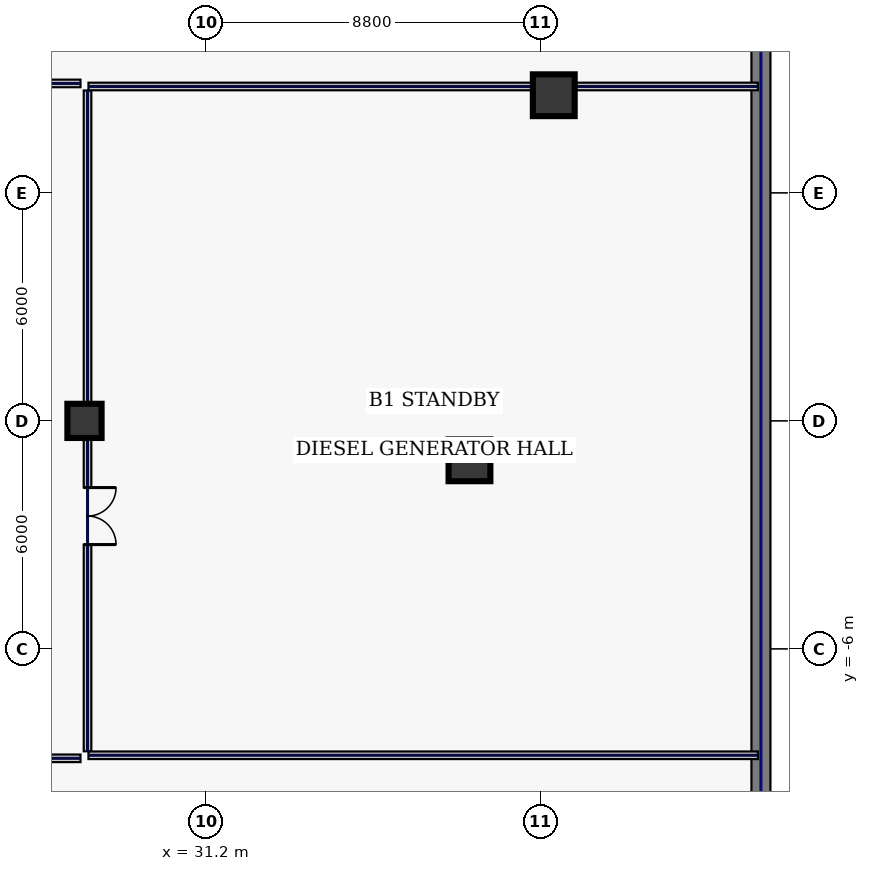
"""IFC4 building model, lengths in metres.
Left out: names, types, materials, properties, quantities, classifications, styles, units other than length and angle.
Written with IfcOpenShell. Run it as: python <this file> out.ifc"""

import sys

from ifc_helpers import new_model, si_unit, direction, frame, frame_2d, origin, origin_2d, place, context, subcontext, project, spatial, rectangle, extrude, element, fill, save


model = new_model("IFC4")
c1 = context("Model", 3, precision=1e-05, world=origin(), true_north=direction((0.0, 1.0)))
c2 = subcontext(c1, "Body", "Model", "MODEL_VIEW")
j1 = project(units=[si_unit("LENGTHUNIT", "METRE"), si_unit("PLANEANGLEUNIT", "RADIAN")], contexts=[c1])
p1 = place(None, origin())
s1 = spatial("IfcSite", under=j1, at=p1, CompositionType="ELEMENT")
p2 = place(p1, origin())
s2 = spatial("IfcBuilding", under=s1, at=p2, CompositionType="ELEMENT")
p3 = place(p2, frame((0.0, 0.0, -5.4)))
s3 = spatial("IfcBuildingStorey", under=s2, at=p3, CompositionType="ELEMENT", Elevation=-5.4)
p4 = place(p3, frame((45.8, -29.8, 0.0), z_axis=(0.0, 0.0, 1.0), x_axis=(0.0, 1.0, 0.0)))
e1 = element("IfcWall", 1, at=p4, inside=s3, PredefinedType="SHEAR", context=c2, shape_type="SweptSolid", body=[
    extrude(rectangle(XDim=56.2, YDim=0.5, at=frame_2d((28.1, 0.0))), origin(), (0.0, 0.0, 1.0), 5.05),
])
p5 = place(p3, frame((28.0, 0.0, 0.0), z_axis=(0.0, 0.0, 1.0), x_axis=(1.0, 0.0, 0.0)))
e2 = element("IfcColumn", 2, at=p5, inside=s3, PredefinedType="COLUMN", context=c2, shape_type="SweptSolid", body=[
    extrude(rectangle(XDim=0.9, YDim=0.9, at=origin_2d()), origin(), (0.0, 0.0, 1.0), 5.05),
])
for number, where, z_axis, x_axis in (
    (3, (38.13, -1.038, 0.0), (0.0, 0.0, 1.0), (1.0, 0.0, 0.0)),
    (4, (40.348, 8.57, 0.0), (0.0, 0.0, 1.0), (1.0, 0.0, 0.0)),
):
    element("IfcColumn", number, at=place(p3, frame(where, z_axis=z_axis, x_axis=x_axis)), inside=s3, PredefinedType="COLUMN", context=c2, shape_type="SweptSolid", body=[
        extrude(rectangle(XDim=1.1, YDim=1.1, at=origin_2d()), origin(), (0.0, 0.0, 1.0), 5.05),
    ])
p6 = place(p3, frame((-27.895, 8.88, 0.0), z_axis=(0.0, 0.0, 1.0), x_axis=(1.0, 0.0, 0.0)))
e5 = element("IfcWall", 5, at=p6, inside=s3, PredefinedType="SOLIDWALL", context=c2, shape_type="SweptSolid", body=[
    extrude(rectangle(XDim=55.79, YDim=0.2, at=frame_2d((27.895, 0.0))), origin(), (0.0, 0.0, 1.0), 5.05),
])
p7 = place(p6, frame((8.484, 0.0, 0.0)))
e6 = element("IfcOpeningElement", 6, at=p7, cuts=e5, PredefinedType="OPENING", context=c2, shape_type="SweptSolid", body=[
    extrude(rectangle(XDim=1.5, YDim=2.3, at=frame_2d((0.75, 1.15))), frame((0.0, 0.11, 0.0), z_axis=(0.0, -1.0, 0.0), x_axis=(1.0, 0.0, 0.0)), (0.0, 0.0, 1.0), 0.22),
])
p8 = place(p6, frame((31.33, 0.0, 0.0)))
e7 = element("IfcOpeningElement", 7, at=p8, cuts=e5, PredefinedType="OPENING", context=c2, shape_type="SweptSolid", body=[
    extrude(rectangle(XDim=1.5, YDim=2.3, at=frame_2d((0.75, 1.15))), frame((0.0, 0.11, 0.0), z_axis=(0.0, -1.0, 0.0), x_axis=(1.0, 0.0, 0.0)), (0.0, 0.0, 1.0), 0.22),
])
p9 = place(p6, frame((50.096, 0.0, 0.0)))
e8 = element("IfcOpeningElement", 8, at=p9, cuts=e5, PredefinedType="OPENING", context=c2, shape_type="SweptSolid", body=[
    extrude(rectangle(XDim=1.5, YDim=2.3, at=frame_2d((0.75, 1.15))), frame((0.0, 0.11, 0.0), z_axis=(0.0, -1.0, 0.0), x_axis=(1.0, 0.0, 0.0)), (0.0, 0.0, 1.0), 0.22),
])
p10 = place(p3, frame((28.08, 8.695, 0.0), z_axis=(0.0, 0.0, 1.0), x_axis=(0.0, -1.0, 0.0)))
e9 = element("IfcWall", 9, at=p10, inside=s3, PredefinedType="SOLIDWALL", context=c2, shape_type="SweptSolid", body=[
    extrude(rectangle(XDim=17.39, YDim=0.2, at=frame_2d((8.695, 0.0))), origin(), (0.0, 0.0, 1.0), 5.05),
])
p11 = place(p10, frame((10.45, 0.0, 0.0)))
e10 = element("IfcOpeningElement", 10, at=p11, cuts=e9, PredefinedType="OPENING", context=c2, shape_type="SweptSolid", body=[
    extrude(rectangle(XDim=1.5, YDim=2.3, at=frame_2d((0.75, 1.15))), frame((0.0, 0.11, 0.0), z_axis=(0.0, -1.0, 0.0), x_axis=(1.0, 0.0, 0.0)), (0.0, 0.0, 1.0), 0.22),
])
p12 = place(p3, frame((27.895, -8.88, 0.0), z_axis=(0.0, 0.0, 1.0), x_axis=(-1.0, 0.0, 0.0)))
e11 = element("IfcWall", 11, at=p12, inside=s3, PredefinedType="SOLIDWALL", context=c2, shape_type="SweptSolid", body=[
    extrude(rectangle(XDim=55.79, YDim=0.2, at=frame_2d((27.895, 0.0))), origin(), (0.0, 0.0, 1.0), 5.05),
])
p13 = place(p12, frame((27.25, 0.0, 0.0)))
e12 = element("IfcOpeningElement", 12, at=p13, cuts=e11, PredefinedType="OPENING", context=c2, shape_type="SweptSolid", body=[
    extrude(rectangle(XDim=1.5, YDim=2.3, at=frame_2d((0.75, 1.15))), frame((0.0, 0.11, 0.0), z_axis=(0.0, -1.0, 0.0), x_axis=(1.0, 0.0, 0.0)), (0.0, 0.0, 1.0), 0.22),
])
for number, where, z_axis, x_axis in (
    (13, (28.105, -8.8, 0.0), (0.0, 0.0, 1.0), (1.0, 0.0, 0.0)),
    (14, (28.105, 8.8, 0.0), (0.0, 0.0, 1.0), (1.0, 0.0, 0.0)),
):
    element("IfcWall", number, at=place(p3, frame(where, z_axis=z_axis, x_axis=x_axis)), inside=s3, PredefinedType="SOLIDWALL", context=c2, shape_type="SweptSolid", body=[
        extrude(rectangle(XDim=17.615, YDim=0.2, at=frame_2d((8.808, 0.0))), origin(), (0.0, 0.0, 1.0), 5.05),
    ])
p14 = place(p11, origin())
e15 = element("IfcDoor", 15, at=p14, inside=s3, OperationType="DOUBLE_SWING_LEFT", PredefinedType="DOOR", context=c2, shape_type="SweptSolid", body=[
    extrude(rectangle(XDim=1.5, YDim=2.3, at=frame_2d((0.75, 1.15))), frame((0.0, 0.025, 0.0), z_axis=(0.0, -1.0, 0.0), x_axis=(1.0, 0.0, 0.0)), (0.0, 0.0, 1.0), 0.05),
])
fill(e10, e15)
save(model, sys.argv[1])
